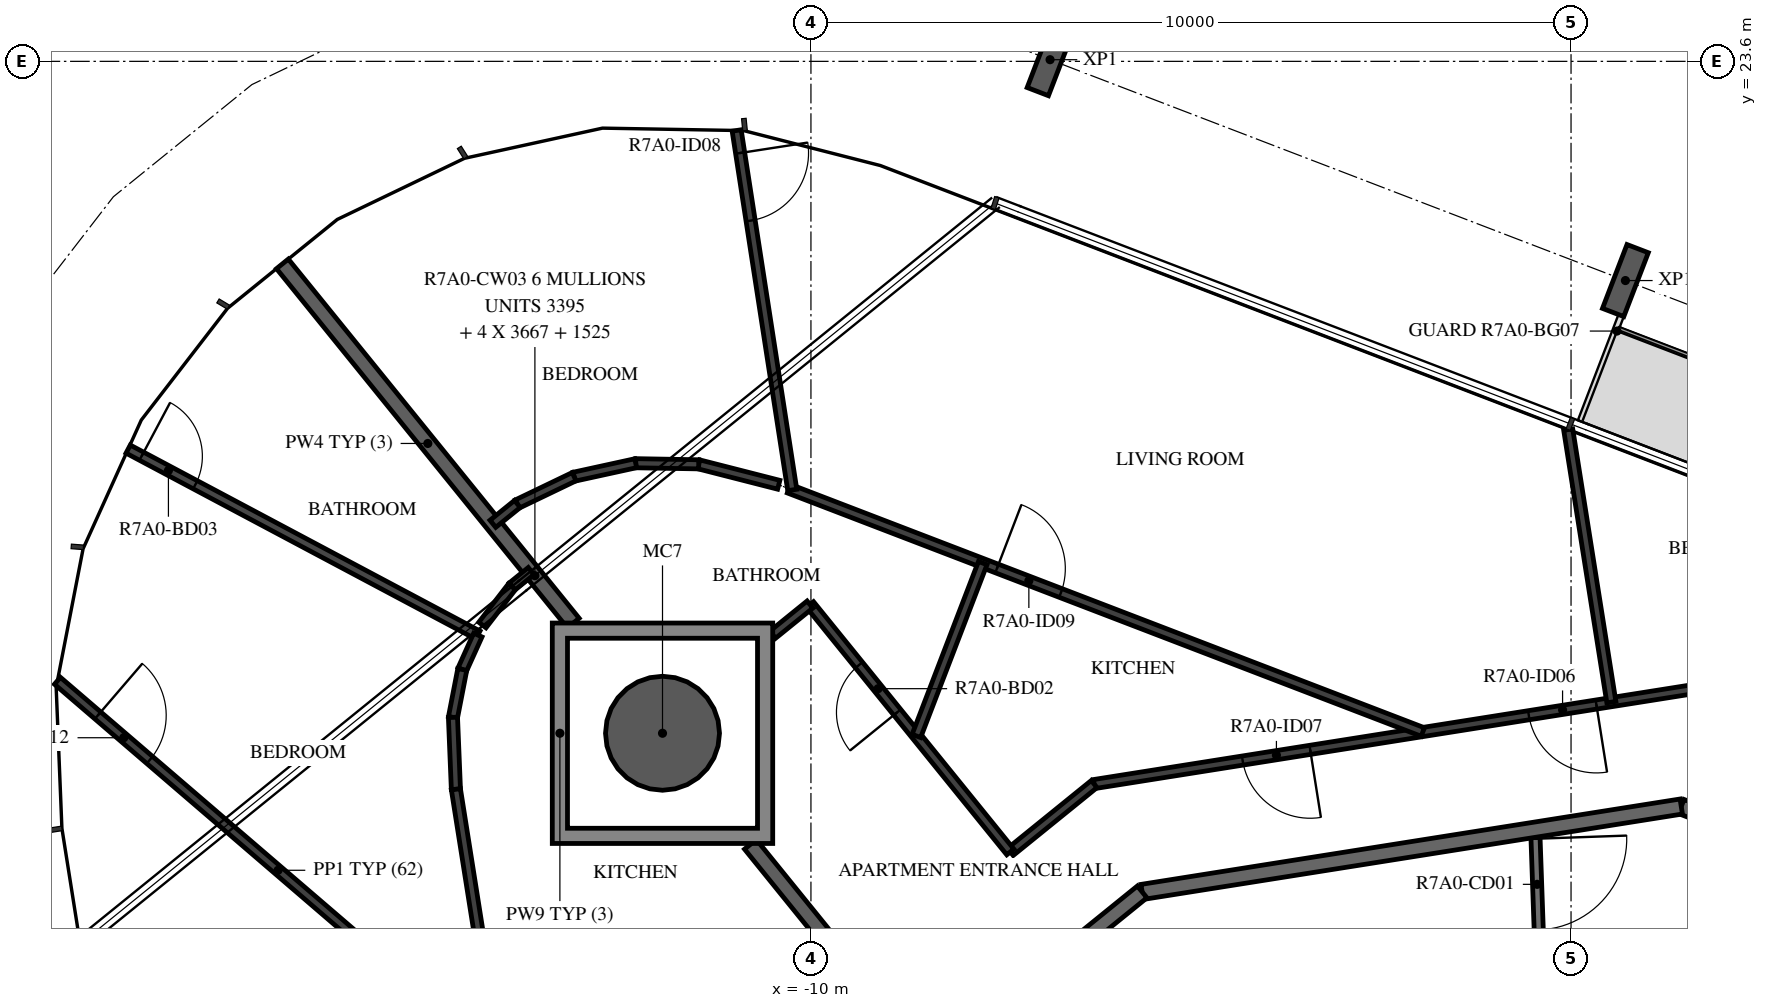
"""IFC4 building model, lengths in metres.
Left out: names, types, materials, properties, quantities, classifications, styles, units other than length and angle.
Written with IfcOpenShell. Run it as: python <this file> out.ifc"""

import sys

from ifc_helpers import new_model, si_unit, direction, frame, frame_2d, origin, origin_2d, place, context, subcontext, project, spatial, polyline, rectangle, hollow_circle, i_section, outline, extrude, element, fill, save


model = new_model("IFC4")
c1 = context("Model", 3, precision=1e-05, world=origin(), true_north=direction((0.0, 1.0)))
c2 = subcontext(c1, "Body", "Model", "MODEL_VIEW")
j1 = project(units=[si_unit("LENGTHUNIT", "METRE"), si_unit("PLANEANGLEUNIT", "RADIAN")], contexts=[c1])
p1 = place(None, origin())
s1 = spatial("IfcSite", under=j1, at=p1, CompositionType="ELEMENT")
p2 = place(p1, origin())
s2 = spatial("IfcBuilding", under=s1, at=p2, CompositionType="ELEMENT")
p3 = place(p2, frame((0.0, 0.0, 270.4)))
s3 = spatial("IfcBuildingStorey", under=s2, at=p3, CompositionType="ELEMENT", Elevation=270.4)
p4 = place(p3, frame((-11.953, 14.76, -0.38), z_axis=(0.0, 0.0, 1.0), x_axis=(1.0, 0.0, 0.0)))
e1 = element("IfcColumn", 1, at=p4, inside=s3, PredefinedType="COLUMN", context=c2, shape_type="SweptSolid", body=[
    extrude(hollow_circle(Radius=0.75, WallThickness=0.035, at=origin_2d()), origin(), (0.0, 0.0, 1.0), 3.5),
])
for number, where, z_axis, x_axis in (
    (2, (0.715, 20.716, -0.38), (0.0, 0.0, 1.0), (0.934, -0.358, 0.0)),
    (3, (-6.854, 23.622, -0.38), (0.0, 0.0, 1.0), (0.934, -0.358, 0.0)),
):
    element("IfcColumn", number, at=place(p3, frame(where, z_axis=z_axis, x_axis=x_axis)), inside=s3, PredefinedType="COLUMN", context=c2, shape_type="SweptSolid", body=[
        extrude(i_section(OverallWidth=0.3, OverallDepth=0.9, WebThickness=0.019, FlangeThickness=0.035, FilletRadius=0.03, at=origin_2d()), origin(), (0.0, 0.0, 1.0), 3.5),
    ])
p5 = place(p3, frame((-0.471, 13.492, 0.0), z_axis=(0.0, 0.0, 1.0), x_axis=(0.034873173869, -0.999391745886, 0.0)))
e4 = element("IfcWall", 4, at=p5, inside=s3, PredefinedType="PARTITIONING", context=c2, shape_type="SweptSolid", body=[
    extrude(rectangle(XDim=1.596, YDim=0.12, at=frame_2d((0.798, 0.0))), origin(), (0.0, 0.0, 1.0), 3.12),
])
p6 = place(p5, frame((0.12, 0.0, 0.0)))
e5 = element("IfcOpeningElement", 5, at=p6, cuts=e4, PredefinedType="OPENING", context=c2, shape_type="SweptSolid", body=[
    extrude(rectangle(XDim=1.2, YDim=2.1, at=frame_2d((0.6, 1.05))), frame((0.0, 0.07, 0.0), z_axis=(0.0, -1.0, 0.0), x_axis=(1.0, 0.0, 0.0)), (0.0, 0.0, 1.0), 0.14),
])
p7 = place(p3, frame((8.154, 11.223, 0.0), z_axis=(0.0, 0.0, 1.0), x_axis=(-0.93359073609, 0.358341090983, 0.0)))
e6 = element("IfcWall", 6, at=p7, inside=s3, PredefinedType="STANDARD", context=c2, shape_type="SweptSolid", body=[
    extrude(rectangle(XDim=7.181, YDim=0.2, at=frame_2d((3.59, 0.0))), origin(), (0.0, 0.0, 1.0), 3.12),
])
p8 = place(p3, frame((1.45, 13.797, 0.0), z_axis=(0.0, 0.0, 1.0), x_axis=(-0.987690361611, -0.156421704315, 0.0)))
e7 = element("IfcWall", 7, at=p8, inside=s3, PredefinedType="STANDARD", context=c2, shape_type="SweptSolid", body=[
    extrude(rectangle(XDim=7.181, YDim=0.2, at=frame_2d((3.591, 0.0))), origin(), (0.0, 0.0, 1.0), 3.12),
])
p9 = place(p3, frame((-5.643, 12.673, 0.0), z_axis=(0.0, 0.0, 1.0), x_axis=(-0.777160148113, -0.629302871585, 0.0)))
e8 = element("IfcWall", 8, at=p9, inside=s3, PredefinedType="STANDARD", context=c2, shape_type="SweptSolid", body=[
    extrude(rectangle(XDim=7.181, YDim=0.2, at=frame_2d((3.59, 0.0))), origin(), (0.0, 0.0, 1.0), 3.12),
])
p10 = place(p9, frame((2.41, 0.0, 0.0)))
e9 = element("IfcOpeningElement", 9, at=p10, cuts=e8, PredefinedType="OPENING", context=c2, shape_type="SweptSolid", body=[
    extrude(rectangle(XDim=1.0, YDim=2.1, at=frame_2d((0.5, 1.05))), frame((0.0, 0.11, 0.0), z_axis=(0.0, -1.0, 0.0), x_axis=(1.0, 0.0, 0.0)), (0.0, 0.0, 1.0), 0.22),
])
p11 = place(p9, frame((5.112, 0.0, 0.0)))
e10 = element("IfcOpeningElement", 10, at=p11, cuts=e8, PredefinedType="OPENING", context=c2, shape_type="SweptSolid", body=[
    extrude(rectangle(XDim=1.0, YDim=2.1, at=frame_2d((0.5, 1.05))), frame((0.0, 0.11, 0.0), z_axis=(0.0, -1.0, 0.0), x_axis=(1.0, 0.0, 0.0)), (0.0, 0.0, 1.0), 0.22),
])
p12 = place(p3, frame((-10.796, 13.299, 0.0), z_axis=(0.0, 0.0, 1.0), x_axis=(0.629290499381, -0.777170166301, 0.0)))
e11 = element("IfcWall", 11, at=p12, inside=s3, PredefinedType="STANDARD", context=c2, shape_type="SweptSolid", body=[
    extrude(rectangle(XDim=3.729, YDim=0.2, at=frame_2d((1.865, 0.0))), origin(), (0.0, 0.0, 1.0), 3.12),
])
p13 = place(p3, frame((-16.953, 20.936, 0.0), z_axis=(0.0, 0.0, 1.0), x_axis=(0.629331057166, -0.777137324085, 0.0)))
e12 = element("IfcWall", 12, at=p13, inside=s3, PredefinedType="STANDARD", context=c2, shape_type="SweptSolid", body=[
    extrude(rectangle(XDim=6.08, YDim=0.2, at=frame_2d((3.04, 0.0))), origin(), (0.0, 0.0, 1.0), 3.12),
])
p14 = place(p3, frame((1.612, 15.341, 0.0), z_axis=(0.0, 0.0, 1.0), x_axis=(-0.987689722749, -0.156425738216, 0.0)))
e13 = element("IfcWall", 13, at=p14, inside=s3, PredefinedType="PARTITIONING", context=c2, shape_type="SweptSolid", body=[
    extrude(rectangle(XDim=7.985, YDim=0.12, at=frame_2d((3.992, 0.0))), origin(), (0.0, 0.0, 1.0), 3.12),
])
p15 = place(p14, frame((1.295, 0.0, 0.0)))
e14 = element("IfcOpeningElement", 14, at=p15, cuts=e13, PredefinedType="OPENING", context=c2, shape_type="SweptSolid", body=[
    extrude(rectangle(XDim=0.9, YDim=2.1, at=frame_2d((0.45, 1.05))), frame((0.0, 0.07, 0.0), z_axis=(0.0, -1.0, 0.0), x_axis=(1.0, 0.0, 0.0)), (0.0, 0.0, 1.0), 0.14),
])
p16 = place(p14, frame((5.107, 0.0, 0.0)))
e15 = element("IfcOpeningElement", 15, at=p16, cuts=e13, PredefinedType="OPENING", context=c2, shape_type="SweptSolid", body=[
    extrude(rectangle(XDim=0.9, YDim=2.1, at=frame_2d((0.45, 1.05))), frame((0.0, 0.07, 0.0), z_axis=(0.0, -1.0, 0.0), x_axis=(1.0, 0.0, 0.0)), (0.0, 0.0, 1.0), 0.14),
])
p17 = place(p3, frame((-6.274, 14.092, 0.0), z_axis=(0.0, 0.0, 1.0), x_axis=(-0.777144673245, -0.629321981855, 0.0)))
e16 = element("IfcWall", 16, at=p17, inside=s3, PredefinedType="PARTITIONING", context=c2, shape_type="SweptSolid", body=[
    extrude(rectangle(XDim=1.419, YDim=0.12, at=frame_2d((0.709, 0.0))), origin(), (0.0, 0.0, 1.0), 3.12),
])
p18 = place(p3, frame((-7.377, 13.199, 0.0), z_axis=(0.0, 0.0, 1.0), x_axis=(-0.629382670352, 0.77709552454, 0.0)))
e17 = element("IfcWall", 17, at=p18, inside=s3, PredefinedType="PARTITIONING", context=c2, shape_type="SweptSolid", body=[
    extrude(rectangle(XDim=4.188, YDim=0.12, at=frame_2d((2.094, 0.0))), origin(), (0.0, 0.0, 1.0), 3.12),
])
p19 = place(p18, frame((2.364, 0.0, 0.0)))
e18 = element("IfcOpeningElement", 18, at=p19, cuts=e17, PredefinedType="OPENING", context=c2, shape_type="SweptSolid", body=[
    extrude(rectangle(XDim=0.8, YDim=2.1, at=frame_2d((0.4, 1.05))), frame((0.0, 0.07, 0.0), z_axis=(0.0, -1.0, 0.0), x_axis=(1.0, 0.0, 0.0)), (0.0, 0.0, 1.0), 0.14),
])
p20 = place(p3, frame((-10.013, 16.454, 0.0), z_axis=(0.0, 0.0, 1.0), x_axis=(-0.777001388062, -0.629498882406, 0.0)))
e19 = element("IfcWall", 19, at=p20, inside=s3, PredefinedType="PARTITIONING", context=c2, shape_type="SweptSolid", body=[
    extrude(rectangle(XDim=0.631, YDim=0.12, at=frame_2d((0.315, 0.0))), origin(), (0.0, 0.0, 1.0), 3.12),
])
p21 = place(p3, frame((-0.037, 18.756, 0.0), z_axis=(0.0, 0.0, 1.0), x_axis=(0.156421851095, -0.987690338365, 0.0)))
e20 = element("IfcWall", 20, at=p21, inside=s3, PredefinedType="PARTITIONING", context=c2, shape_type="SweptSolid", body=[
    extrude(rectangle(XDim=3.63, YDim=0.12, at=frame_2d((1.815, 0.0))), origin(), (0.0, 0.0, 1.0), 3.12),
])
p22 = place(p3, frame((-10.289, 17.978, 0.0), z_axis=(0.0, 0.0, 1.0), x_axis=(0.933579293595, -0.358370900844, 0.0)))
e21 = element("IfcWall", 21, at=p22, inside=s3, PredefinedType="PARTITIONING", context=c2, shape_type="SweptSolid", body=[
    extrude(rectangle(XDim=8.932, YDim=0.12, at=frame_2d((4.466, 0.0))), origin(), (0.0, 0.0, 1.0), 3.12),
])
p23 = place(p22, frame((2.93, 0.0, 0.0)))
e22 = element("IfcOpeningElement", 22, at=p23, cuts=e21, PredefinedType="OPENING", context=c2, shape_type="SweptSolid", body=[
    extrude(rectangle(XDim=0.9, YDim=2.1, at=frame_2d((0.45, 1.05))), frame((0.0, 0.07, 0.0), z_axis=(0.0, -1.0, 0.0), x_axis=(1.0, 0.0, 0.0)), (0.0, 0.0, 1.0), 0.14),
])
p24 = place(p3, frame((-10.977, 22.691, 0.0), z_axis=(0.0, 0.0, 1.0), x_axis=(0.152888983102, -0.988243370252, 0.0)))
e23 = element("IfcWall", 23, at=p24, inside=s3, PredefinedType="PARTITIONING", context=c2, shape_type="SweptSolid", body=[
    extrude(rectangle(XDim=4.786, YDim=0.12, at=frame_2d((2.393, 0.0))), origin(), (0.0, 0.0, 1.0), 3.12),
])
p25 = place(p24, frame((0.3, 0.0, 0.0)))
e24 = element("IfcOpeningElement", 24, at=p25, cuts=e23, PredefinedType="OPENING", context=c2, shape_type="SweptSolid", body=[
    extrude(rectangle(XDim=0.9, YDim=2.1, at=frame_2d((0.45, 1.05))), frame((0.0, 0.07, 0.0), z_axis=(0.0, -1.0, 0.0), x_axis=(1.0, 0.0, 0.0)), (0.0, 0.0, 1.0), 0.14),
])
p26 = place(p3, frame((-7.74, 17.0, 0.0), z_axis=(0.0, 0.0, 1.0), x_axis=(-0.358394723652, -0.93357014844, 0.0)))
e25 = element("IfcWall", 25, at=p26, inside=s3, PredefinedType="PARTITIONING", context=c2, shape_type="SweptSolid", body=[
    extrude(rectangle(XDim=2.436, YDim=0.12, at=frame_2d((1.218, 0.0))), origin(), (0.0, 0.0, 1.0), 3.12),
])
p27 = place(p3, frame((-10.424, 18.03, 0.0), z_axis=(0.0, 0.0, 1.0), x_axis=(-0.968874161395, 0.247553750489, 0.0)))
e26 = element("IfcWall", 26, at=p27, inside=s3, PredefinedType="PARTITIONING", context=c2, shape_type="SweptSolid", body=[
    extrude(rectangle(XDim=1.087, YDim=0.12, at=frame_2d((0.543, 0.0))), origin(), (0.0, 0.0, 1.0), 3.12),
])
p28 = place(p3, frame((-11.477, 18.299, 0.0), z_axis=(0.0, 0.0, 1.0), x_axis=(-0.999848939146, 0.017380992165, 0.0)))
e27 = element("IfcWall", 27, at=p28, inside=s3, PredefinedType="PARTITIONING", context=c2, shape_type="SweptSolid", body=[
    extrude(rectangle(XDim=0.829, YDim=0.12, at=frame_2d((0.415, 0.0))), origin(), (0.0, 0.0, 1.0), 3.12),
])
p29 = place(p3, frame((-12.305, 18.313, 0.0), z_axis=(0.0, 0.0, 1.0), x_axis=(-0.976949932909, -0.21346856581, 0.0)))
e28 = element("IfcWall", 28, at=p29, inside=s3, PredefinedType="PARTITIONING", context=c2, shape_type="SweptSolid", body=[
    extrude(rectangle(XDim=0.829, YDim=0.12, at=frame_2d((0.415, 0.0))), origin(), (0.0, 0.0, 1.0), 3.12),
])
p30 = place(p3, frame((-13.115, 18.136, 0.0), z_axis=(0.0, 0.0, 1.0), x_axis=(-0.901385111422, -0.43301833784, 0.0)))
e29 = element("IfcWall", 29, at=p30, inside=s3, PredefinedType="PARTITIONING", context=c2, shape_type="SweptSolid", body=[
    extrude(rectangle(XDim=0.829, YDim=0.12, at=frame_2d((0.415, 0.0))), origin(), (0.0, 0.0, 1.0), 3.12),
])
p31 = place(p3, frame((-13.862, 17.777, 0.0), z_axis=(0.0, 0.0, 1.0), x_axis=(-0.776888119785, -0.629638665694, 0.0)))
e30 = element("IfcWall", 30, at=p31, inside=s3, PredefinedType="PARTITIONING", context=c2, shape_type="SweptSolid", body=[
    extrude(rectangle(XDim=0.415, YDim=0.12, at=frame_2d((0.207, 0.0))), origin(), (0.0, 0.0, 1.0), 3.12),
])
p32 = place(p3, frame((-14.323, 16.184, 0.0), z_axis=(0.0, 0.0, 1.0), x_axis=(0.611198506308, 0.791477343887, 0.0)))
e31 = element("IfcWall", 31, at=p32, inside=s3, PredefinedType="PARTITIONING", context=c2, shape_type="SweptSolid", body=[
    extrude(rectangle(XDim=0.642, YDim=0.12, at=frame_2d((0.321, 0.0))), origin(), (0.0, 0.0, 1.0), 3.12),
])
p33 = place(p3, frame((-13.93, 16.692, 0.0), z_axis=(0.0, 0.0, 1.0), x_axis=(0.776695397137, 0.62987638475, 0.0)))
e32 = element("IfcWall", 32, at=p33, inside=s3, PredefinedType="PARTITIONING", context=c2, shape_type="SweptSolid", body=[
    extrude(rectangle(XDim=0.321, YDim=0.12, at=frame_2d((0.161, 0.0))), origin(), (0.0, 0.0, 1.0), 3.12),
])
p34 = place(p3, frame((-18.983, 18.499, 0.0), z_axis=(0.0, 0.0, 1.0), x_axis=(0.882948840489, -0.469469216328, 0.0)))
e33 = element("IfcWall", 33, at=p34, inside=s3, PredefinedType="PARTITIONING", context=c2, shape_type="SweptSolid", body=[
    extrude(rectangle(XDim=5.211, YDim=0.12, at=frame_2d((2.605, 0.0))), origin(), (0.0, 0.0, 1.0), 2.73),
])
p35 = place(p34, frame((0.2, 0.0, 0.0)))
e34 = element("IfcOpeningElement", 34, at=p35, cuts=e33, PredefinedType="OPENING", context=c2, shape_type="SweptSolid", body=[
    extrude(rectangle(XDim=0.8, YDim=2.1, at=frame_2d((0.4, 1.05))), frame((0.0, 0.07, 0.0), z_axis=(0.0, -1.0, 0.0), x_axis=(1.0, 0.0, 0.0)), (0.0, 0.0, 1.0), 0.14),
])
p36 = place(p3, frame((-14.382, 16.052, 0.0), z_axis=(0.0, 0.0, 1.0), x_axis=(-0.412099912529, -0.911138662385, 0.0)))
e35 = element("IfcWall", 35, at=p36, inside=s3, PredefinedType="PARTITIONING", context=c2, shape_type="SweptSolid", body=[
    extrude(rectangle(XDim=0.497, YDim=0.12, at=frame_2d((0.249, 0.0))), origin(), (0.0, 0.0, 1.0), 3.12),
])
p37 = place(p3, frame((-14.587, 15.6, 0.0), z_axis=(0.0, 0.0, 1.0), x_axis=(-0.190920556667, -0.98160549155, 0.0)))
e36 = element("IfcWall", 36, at=p37, inside=s3, PredefinedType="PARTITIONING", context=c2, shape_type="SweptSolid", body=[
    extrude(rectangle(XDim=0.642, YDim=0.12, at=frame_2d((0.321, 0.0))), origin(), (0.0, 0.0, 1.0), 3.12),
])
p38 = place(p3, frame((-14.709, 14.969, 0.0), z_axis=(0.0, 0.0, 1.0), x_axis=(0.040729848009, -0.999170195453, 0.0)))
e37 = element("IfcWall", 37, at=p38, inside=s3, PredefinedType="PARTITIONING", context=c2, shape_type="SweptSolid", body=[
    extrude(rectangle(XDim=0.947, YDim=0.12, at=frame_2d((0.474, 0.0))), origin(), (0.0, 0.0, 1.0), 3.12),
])
p39 = place(p3, frame((-14.671, 14.023, 0.0), z_axis=(0.0, 0.0, 1.0), x_axis=(0.156438190471, -0.987687750538, 0.0)))
e38 = element("IfcWall", 38, at=p39, inside=s3, PredefinedType="PARTITIONING", context=c2, shape_type="SweptSolid", body=[
    extrude(rectangle(XDim=7.644, YDim=0.12, at=frame_2d((3.822, 0.0))), origin(), (0.0, 0.0, 1.0), 3.12),
])
p40 = place(p39, frame((3.803, 0.0, 0.0)))
e39 = element("IfcOpeningElement", 39, at=p40, cuts=e38, PredefinedType="OPENING", context=c2, shape_type="SweptSolid", body=[
    extrude(rectangle(XDim=0.9, YDim=2.1, at=frame_2d((0.45, 1.05))), frame((0.0, 0.07, 0.0), z_axis=(0.0, -1.0, 0.0), x_axis=(1.0, 0.0, 0.0)), (0.0, 0.0, 1.0), 0.14),
])
p41 = place(p3, frame((-19.913, 15.451, 0.0), z_axis=(0.0, 0.0, 1.0), x_axis=(0.758623462992, -0.6515293097, 0.0)))
e40 = element("IfcWall", 40, at=p41, inside=s3, PredefinedType="PARTITIONING", context=c2, shape_type="SweptSolid", body=[
    extrude(rectangle(XDim=7.653, YDim=0.12, at=frame_2d((3.826, 0.0))), origin(), (0.0, 0.0, 1.0), 3.12),
])
p42 = place(p41, frame((0.7, 0.0, 0.0)))
e41 = element("IfcOpeningElement", 41, at=p42, cuts=e40, PredefinedType="OPENING", context=c2, shape_type="SweptSolid", body=[
    extrude(rectangle(XDim=0.9, YDim=2.1, at=frame_2d((0.45, 1.05))), frame((0.0, 0.07, 0.0), z_axis=(0.0, -1.0, 0.0), x_axis=(1.0, 0.0, 0.0)), (0.0, 0.0, 1.0), 0.14),
])
p43 = place(p3, origin())
e42 = element("IfcWall", 42, at=p43, inside=s3, PredefinedType="STANDARD", context=c2, shape_type="SweptSolid", body=[
    extrude(outline(polyline([(-10.503, 16.21), (-10.503, 13.311), (-13.403, 13.311), (-13.403, 16.21), (-10.503, 16.21)]), holes=[polyline([(-13.203, 13.51), (-10.703, 13.51), (-10.703, 16.01), (-13.203, 16.01), (-13.203, 13.51)])]), origin(), (0.0, 0.0, 1.0), 3.12),
])
p44 = place(p15, origin())
e43 = element("IfcDoor", 43, at=p44, inside=s3, OperationType="SINGLE_SWING_RIGHT", PredefinedType="DOOR", context=c2, shape_type="SweptSolid", body=[
    extrude(rectangle(XDim=0.9, YDim=2.1, at=frame_2d((0.45, 1.05))), frame((0.0, 0.025, 0.0), z_axis=(0.0, -1.0, 0.0), x_axis=(1.0, 0.0, 0.0)), (0.0, 0.0, 1.0), 0.05),
])
fill(e14, e43)
p45 = place(p16, origin())
e44 = element("IfcDoor", 44, at=p45, inside=s3, OperationType="SINGLE_SWING_RIGHT", PredefinedType="DOOR", context=c2, shape_type="SweptSolid", body=[
    extrude(rectangle(XDim=0.9, YDim=2.1, at=frame_2d((0.45, 1.05))), frame((0.0, 0.025, 0.0), z_axis=(0.0, -1.0, 0.0), x_axis=(1.0, 0.0, 0.0)), (0.0, 0.0, 1.0), 0.05),
])
fill(e15, e44)
p46 = place(p19, origin())
e45 = element("IfcDoor", 45, at=p46, inside=s3, OperationType="SINGLE_SWING_RIGHT", PredefinedType="DOOR", context=c2, shape_type="SweptSolid", body=[
    extrude(rectangle(XDim=0.8, YDim=2.1, at=frame_2d((0.4, 1.05))), frame((0.0, 0.025, 0.0), z_axis=(0.0, -1.0, 0.0), x_axis=(1.0, 0.0, 0.0)), (0.0, 0.0, 1.0), 0.05),
])
fill(e18, e45)
p47 = place(p25, origin())
e46 = element("IfcDoor", 46, at=p47, inside=s3, OperationType="SINGLE_SWING_RIGHT", PredefinedType="DOOR", context=c2, shape_type="SweptSolid", body=[
    extrude(rectangle(XDim=0.9, YDim=2.1, at=frame_2d((0.45, 1.05))), frame((0.0, 0.025, 0.0), z_axis=(0.0, -1.0, 0.0), x_axis=(1.0, 0.0, 0.0)), (0.0, 0.0, 1.0), 0.05),
])
fill(e24, e46)
p48 = place(p23, origin())
e47 = element("IfcDoor", 47, at=p48, inside=s3, OperationType="SINGLE_SWING_LEFT", PredefinedType="DOOR", context=c2, shape_type="SweptSolid", body=[
    extrude(rectangle(XDim=0.9, YDim=2.1, at=frame_2d((0.45, 1.05))), frame((0.0, 0.025, 0.0), z_axis=(0.0, -1.0, 0.0), x_axis=(1.0, 0.0, 0.0)), (0.0, 0.0, 1.0), 0.05),
])
fill(e22, e47)
p49 = place(p42, origin())
e48 = element("IfcDoor", 48, at=p49, inside=s3, OperationType="SINGLE_SWING_LEFT", PredefinedType="DOOR", context=c2, shape_type="SweptSolid", body=[
    extrude(rectangle(XDim=0.9, YDim=2.1, at=frame_2d((0.45, 1.05))), frame((0.0, 0.025, 0.0), z_axis=(0.0, -1.0, 0.0), x_axis=(1.0, 0.0, 0.0)), (0.0, 0.0, 1.0), 0.05),
])
fill(e41, e48)
p50 = place(p35, origin())
e49 = element("IfcDoor", 49, at=p50, inside=s3, OperationType="SINGLE_SWING_LEFT", PredefinedType="DOOR", context=c2, shape_type="SweptSolid", body=[
    extrude(rectangle(XDim=0.8, YDim=2.1, at=frame_2d((0.4, 1.05))), frame((0.0, 0.025, 0.0), z_axis=(0.0, -1.0, 0.0), x_axis=(1.0, 0.0, 0.0)), (0.0, 0.0, 1.0), 0.05),
])
fill(e34, e49)
p51 = place(p6, origin())
e50 = element("IfcDoor", 50, at=p51, inside=s3, OperationType="DOUBLE_DOOR_SINGLE_SWING", PredefinedType="DOOR", context=c2, shape_type="SweptSolid", body=[
    extrude(rectangle(XDim=1.2, YDim=2.1, at=frame_2d((0.6, 1.05))), frame((0.0, 0.025, 0.0), z_axis=(0.0, -1.0, 0.0), x_axis=(1.0, 0.0, 0.0)), (0.0, 0.0, 1.0), 0.05),
])
fill(e5, e50)
save(model, sys.argv[1])
